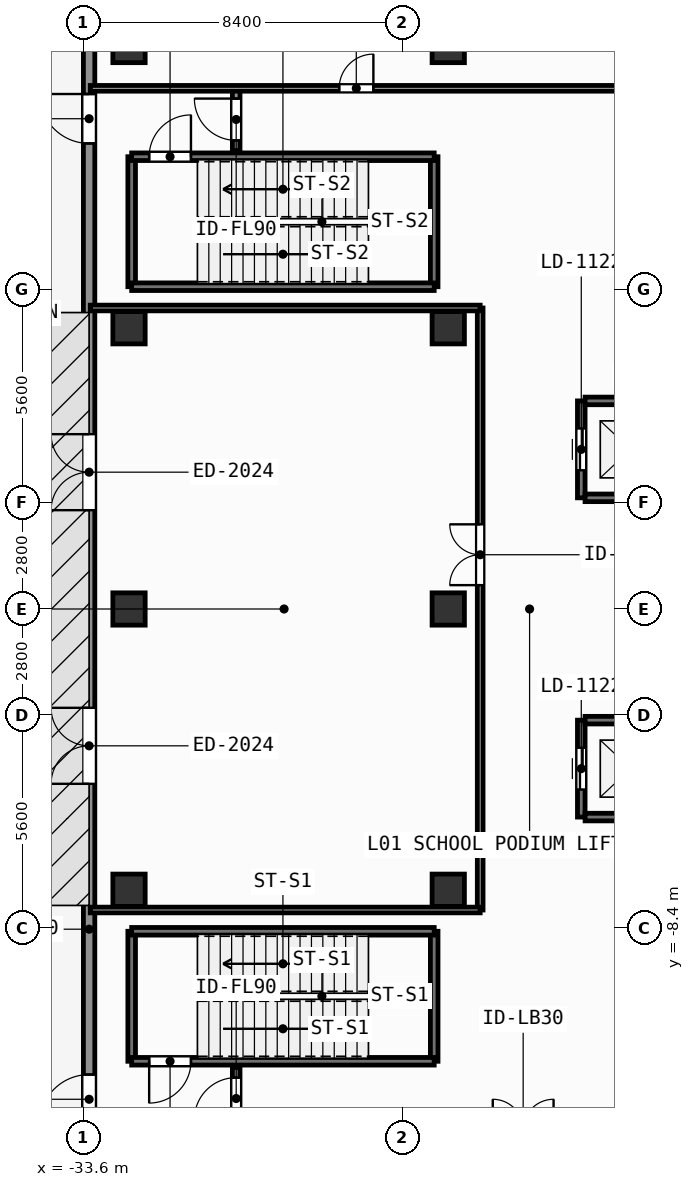
"""IFC4 building model, lengths in metres.
Left out: names, types, materials, properties, quantities, classifications, styles, units other than length and angle.
Written with IfcOpenShell. Run it as: python <this file> out.ifc"""

import sys

from ifc_helpers import new_model, si_unit, direction, frame, frame_2d, origin, origin_2d, place, context, subcontext, project, spatial, rectangle, extrude, element, fill, save


model = new_model("IFC4")
c1 = context("Model", 3, precision=1e-05, world=origin(), true_north=direction((0.0, 1.0)))
c2 = subcontext(c1, "Body", "Model", "MODEL_VIEW")
j1 = project(units=[si_unit("LENGTHUNIT", "METRE"), si_unit("PLANEANGLEUNIT", "RADIAN")], contexts=[c1])
p1 = place(None, origin())
s1 = spatial("IfcSite", under=j1, at=p1, CompositionType="ELEMENT")
p2 = place(p1, origin())
s2 = spatial("IfcBuilding", under=s1, at=p2, CompositionType="ELEMENT")
p3 = place(p2, origin())
s3 = spatial("IfcBuildingStorey", under=s2, at=p3, CompositionType="ELEMENT", Elevation=0.0)
for number, where, z_axis, x_axis in (
    (1, (-32.4, -7.4, 0.0), (0.0, 0.0, 1.0), (1.0, 0.0, 0.0)),
    (2, (-32.4, 0.0, 0.0), (0.0, 0.0, 1.0), (1.0, 0.0, 0.0)),
    (3, (-32.4, 7.4, 0.0), (0.0, 0.0, 1.0), (1.0, 0.0, 0.0)),
    (4, (-32.4, 14.8, 0.0), (0.0, 0.0, 1.0), (1.0, 0.0, 0.0)),
    (5, (-24.0, -7.4, 0.0), (0.0, 0.0, 1.0), (1.0, 0.0, 0.0)),
    (6, (-24.0, 0.0, 0.0), (0.0, 0.0, 1.0), (1.0, 0.0, 0.0)),
    (7, (-24.0, 7.4, 0.0), (0.0, 0.0, 1.0), (1.0, 0.0, 0.0)),
    (8, (-24.0, 14.8, 0.0), (0.0, 0.0, 1.0), (1.0, 0.0, 0.0)),
):
    element("IfcColumn", number, at=place(p3, frame(where, z_axis=z_axis, x_axis=x_axis)), inside=s3, PredefinedType="COLUMN", context=c2, shape_type="SweptSolid", body=[
        extrude(rectangle(XDim=0.85, YDim=0.85, at=origin_2d()), origin(), (0.0, 0.0, 1.0), 4.8),
    ])
p4 = place(p3, frame((-33.45, -20.5, 0.0), z_axis=(0.0, 0.0, 1.0), x_axis=(0.0, 1.0, 0.0)))
e9 = element("IfcWall", 9, at=p4, inside=s3, PredefinedType="SOLIDWALL", context=c2, shape_type="SweptSolid", body=[
    extrude(rectangle(XDim=41.0, YDim=0.3, at=frame_2d((20.5, 0.0))), origin(), (0.0, 0.0, 1.0), 4.56),
])
p5 = place(p4, frame((15.9, 0.0, 0.0)))
e10 = element("IfcOpeningElement", 10, at=p5, cuts=e9, PredefinedType="OPENING", context=c2, shape_type="SweptSolid", body=[
    extrude(rectangle(XDim=2.0, YDim=2.4, at=frame_2d((1.0, 1.2))), frame((0.0, 0.16, 0.0), z_axis=(0.0, -1.0, 0.0), x_axis=(1.0, 0.0, 0.0)), (0.0, 0.0, 1.0), 0.32),
])
p6 = place(p4, frame((23.1, 0.0, 0.0)))
e11 = element("IfcOpeningElement", 11, at=p6, cuts=e9, PredefinedType="OPENING", context=c2, shape_type="SweptSolid", body=[
    extrude(rectangle(XDim=2.0, YDim=2.4, at=frame_2d((1.0, 1.2))), frame((0.0, 0.16, 0.0), z_axis=(0.0, -1.0, 0.0), x_axis=(1.0, 0.0, 0.0)), (0.0, 0.0, 1.0), 0.32),
])
p7 = place(p4, frame((6.95, 0.0, 0.0)))
e12 = element("IfcOpeningElement", 12, at=p7, cuts=e9, PredefinedType="OPENING", context=c2, shape_type="SweptSolid", body=[
    extrude(rectangle(XDim=1.3, YDim=2.2, at=frame_2d((0.65, 1.1))), frame((0.0, 0.16, 0.0), z_axis=(0.0, -1.0, 0.0), x_axis=(1.0, 0.0, 0.0)), (0.0, 0.0, 1.0), 0.32),
])
p8 = place(p4, frame((32.75, 0.0, 0.0)))
e13 = element("IfcOpeningElement", 13, at=p8, cuts=e9, PredefinedType="OPENING", context=c2, shape_type="SweptSolid", body=[
    extrude(rectangle(XDim=1.3, YDim=2.2, at=frame_2d((0.65, 1.1))), frame((0.0, 0.16, 0.0), z_axis=(0.0, -1.0, 0.0), x_axis=(1.0, 0.0, 0.0)), (0.0, 0.0, 1.0), 0.32),
])
p9 = place(p3, frame((-20.5, -5.475, 0.0), z_axis=(0.0, 0.0, 1.0), x_axis=(0.0, 1.0, 0.0)))
e14 = element("IfcWall", 14, at=p9, inside=s3, PredefinedType="SHEAR", context=c2, shape_type="SweptSolid", body=[
    extrude(rectangle(XDim=2.55, YDim=0.2, at=frame_2d((1.275, 0.0))), origin(), (0.0, 0.0, 1.0), 4.56),
])
p10 = place(p9, frame((0.725, 0.0, 0.0)))
e15 = element("IfcOpeningElement", 15, at=p10, cuts=e14, PredefinedType="OPENING", context=c2, shape_type="SweptSolid", body=[
    extrude(rectangle(XDim=1.1, YDim=2.2, at=frame_2d((0.55, 1.1))), frame((0.0, 0.11, 0.0), z_axis=(0.0, -1.0, 0.0), x_axis=(1.0, 0.0, 0.0)), (0.0, 0.0, 1.0), 0.22),
])
for number, where, z_axis, x_axis in (
    (16, (-20.4, -5.475, 0.0), (0.0, 0.0, 1.0), (1.0, 0.0, 0.0)),
    (17, (-20.4, -2.925, 0.0), (0.0, 0.0, 1.0), (1.0, 0.0, 0.0)),
):
    element("IfcWall", number, at=place(p3, frame(where, z_axis=z_axis, x_axis=x_axis)), inside=s3, PredefinedType="SHEAR", context=c2, shape_type="SweptSolid", body=[
        extrude(rectangle(XDim=2.4, YDim=0.2, at=frame_2d((1.2, 0.0))), origin(), (0.0, 0.0, 1.0), 4.56),
    ])
p11 = place(p3, frame((-20.5, 2.925, 0.0), z_axis=(0.0, 0.0, 1.0), x_axis=(0.0, 1.0, 0.0)))
e18 = element("IfcWall", 18, at=p11, inside=s3, PredefinedType="SHEAR", context=c2, shape_type="SweptSolid", body=[
    extrude(rectangle(XDim=2.55, YDim=0.2, at=frame_2d((1.275, 0.0))), origin(), (0.0, 0.0, 1.0), 4.56),
])
p12 = place(p11, frame((0.725, 0.0, 0.0)))
e19 = element("IfcOpeningElement", 19, at=p12, cuts=e18, PredefinedType="OPENING", context=c2, shape_type="SweptSolid", body=[
    extrude(rectangle(XDim=1.1, YDim=2.2, at=frame_2d((0.55, 1.1))), frame((0.0, 0.11, 0.0), z_axis=(0.0, -1.0, 0.0), x_axis=(1.0, 0.0, 0.0)), (0.0, 0.0, 1.0), 0.22),
])
for number, where, z_axis, x_axis in (
    (20, (-20.4, 2.925, 0.0), (0.0, 0.0, 1.0), (1.0, 0.0, 0.0)),
    (21, (-20.4, 5.475, 0.0), (0.0, 0.0, 1.0), (1.0, 0.0, 0.0)),
):
    element("IfcWall", number, at=place(p3, frame(where, z_axis=z_axis, x_axis=x_axis)), inside=s3, PredefinedType="SHEAR", context=c2, shape_type="SweptSolid", body=[
        extrude(rectangle(XDim=2.4, YDim=0.2, at=frame_2d((1.2, 0.0))), origin(), (0.0, 0.0, 1.0), 4.56),
    ])
for number, where, z_axis, x_axis in (
    (22, (-32.33, -11.9, 0.0), (0.0, 0.0, 1.0), (0.0, 1.0, 0.0)),
    (23, (-24.37, -8.48, 0.0), (0.0, 0.0, 1.0), (0.0, -1.0, 0.0)),
):
    element("IfcWall", number, at=place(p3, frame(where, z_axis=z_axis, x_axis=x_axis)), inside=s3, PredefinedType="SHEAR", context=c2, shape_type="SweptSolid", body=[
        extrude(rectangle(XDim=3.42, YDim=0.2, at=frame_2d((1.71, 0.0))), origin(), (0.0, 0.0, 1.0), 4.56),
    ])
p13 = place(p3, frame((-24.37, -11.9, 0.0), z_axis=(0.0, 0.0, 1.0), x_axis=(-1.0, 0.0, 0.0)))
e24 = element("IfcWall", 24, at=p13, inside=s3, PredefinedType="SHEAR", context=c2, shape_type="SweptSolid", body=[
    extrude(rectangle(XDim=7.96, YDim=0.2, at=frame_2d((3.98, 0.0))), origin(), (0.0, 0.0, 1.0), 4.56),
])
p14 = place(p13, frame((6.4, 0.0, 0.0)))
e25 = element("IfcOpeningElement", 25, at=p14, cuts=e24, PredefinedType="OPENING", context=c2, shape_type="SweptSolid", body=[
    extrude(rectangle(XDim=1.1, YDim=2.15, at=frame_2d((0.55, 1.075))), frame((0.0, 0.11, 0.0), z_axis=(0.0, -1.0, 0.0), x_axis=(1.0, 0.0, 0.0)), (0.0, 0.0, 1.0), 0.22),
])
p15 = place(p3, frame((-32.33, -8.48, 0.0), z_axis=(0.0, 0.0, 1.0), x_axis=(1.0, 0.0, 0.0)))
e26 = element("IfcWall", 26, at=p15, inside=s3, PredefinedType="SHEAR", context=c2, shape_type="SweptSolid", body=[
    extrude(rectangle(XDim=7.96, YDim=0.2, at=frame_2d((3.98, 0.0))), origin(), (0.0, 0.0, 1.0), 4.56),
])
for number, where, z_axis, x_axis in (
    (27, (-32.33, 8.48, 0.0), (0.0, 0.0, 1.0), (0.0, 1.0, 0.0)),
    (28, (-24.37, 11.9, 0.0), (0.0, 0.0, 1.0), (0.0, -1.0, 0.0)),
):
    element("IfcWall", number, at=place(p3, frame(where, z_axis=z_axis, x_axis=x_axis)), inside=s3, PredefinedType="SHEAR", context=c2, shape_type="SweptSolid", body=[
        extrude(rectangle(XDim=3.42, YDim=0.2, at=frame_2d((1.71, 0.0))), origin(), (0.0, 0.0, 1.0), 4.56),
    ])
p16 = place(p3, frame((-24.37, 8.48, 0.0), z_axis=(0.0, 0.0, 1.0), x_axis=(-1.0, 0.0, 0.0)))
e29 = element("IfcWall", 29, at=p16, inside=s3, PredefinedType="SHEAR", context=c2, shape_type="SweptSolid", body=[
    extrude(rectangle(XDim=7.96, YDim=0.2, at=frame_2d((3.98, 0.0))), origin(), (0.0, 0.0, 1.0), 4.56),
])
p17 = place(p3, frame((-32.33, 11.9, 0.0), z_axis=(0.0, 0.0, 1.0), x_axis=(1.0, 0.0, 0.0)))
e30 = element("IfcWall", 30, at=p17, inside=s3, PredefinedType="SHEAR", context=c2, shape_type="SweptSolid", body=[
    extrude(rectangle(XDim=7.96, YDim=0.2, at=frame_2d((3.98, 0.0))), origin(), (0.0, 0.0, 1.0), 4.56),
])
p18 = place(p17, frame((0.46, 0.0, 0.0)))
e31 = element("IfcOpeningElement", 31, at=p18, cuts=e30, PredefinedType="OPENING", context=c2, shape_type="SweptSolid", body=[
    extrude(rectangle(XDim=1.1, YDim=2.15, at=frame_2d((0.55, 1.075))), frame((0.0, 0.11, 0.0), z_axis=(0.0, -1.0, 0.0), x_axis=(1.0, 0.0, 0.0)), (0.0, 0.0, 1.0), 0.22),
])
p19 = place(p3, frame((-29.58, -13.7, 0.0), z_axis=(0.0, 0.0, 1.0), x_axis=(0.0, 1.0, 0.0)))
e32 = element("IfcWall", 32, at=p19, inside=s3, PredefinedType="SOLIDWALL", context=c2, shape_type="SweptSolid", body=[
    extrude(rectangle(XDim=1.64, YDim=0.2, at=frame_2d((0.82, 0.0))), origin(), (0.0, 0.0, 1.0), 4.56),
])
p20 = place(p19, frame((0.27, 0.0, 0.0)))
e33 = element("IfcOpeningElement", 33, at=p20, cuts=e32, PredefinedType="OPENING", context=c2, shape_type="SweptSolid", body=[
    extrude(rectangle(XDim=1.1, YDim=2.15, at=frame_2d((0.55, 1.075))), frame((0.0, 0.11, 0.0), z_axis=(0.0, -1.0, 0.0), x_axis=(1.0, 0.0, 0.0)), (0.0, 0.0, 1.0), 0.22),
])
p21 = place(p3, frame((-29.58, 12.06, 0.0), z_axis=(0.0, 0.0, 1.0), x_axis=(0.0, 1.0, 0.0)))
e34 = element("IfcWall", 34, at=p21, inside=s3, PredefinedType="SOLIDWALL", context=c2, shape_type="SweptSolid", body=[
    extrude(rectangle(XDim=1.64, YDim=0.2, at=frame_2d((0.82, 0.0))), origin(), (0.0, 0.0, 1.0), 4.56),
])
p22 = place(p21, frame((0.27, 0.0, 0.0)))
e35 = element("IfcOpeningElement", 35, at=p22, cuts=e34, PredefinedType="OPENING", context=c2, shape_type="SweptSolid", body=[
    extrude(rectangle(XDim=1.1, YDim=2.15, at=frame_2d((0.55, 1.075))), frame((0.0, 0.11, 0.0), z_axis=(0.0, -1.0, 0.0), x_axis=(1.0, 0.0, 0.0)), (0.0, 0.0, 1.0), 0.22),
])
p23 = place(p3, frame((-33.42, 13.7, 0.0), z_axis=(0.0, 0.0, 1.0), x_axis=(1.0, 0.0, 0.0)))
e36 = element("IfcWall", 36, at=p23, inside=s3, PredefinedType="PARTITIONING", context=c2, shape_type="SweptSolid", body=[
    extrude(rectangle(XDim=14.0, YDim=0.15, at=frame_2d((7.0, 0.0))), origin(), (0.0, 0.0, 1.0), 4.56),
])
p24 = place(p23, frame((6.55, 0.0, 0.0)))
e37 = element("IfcOpeningElement", 37, at=p24, cuts=e36, PredefinedType="OPENING", context=c2, shape_type="SweptSolid", body=[
    extrude(rectangle(XDim=0.9, YDim=2.1, at=frame_2d((0.45, 1.05))), frame((0.0, 0.085, 0.0), z_axis=(0.0, -1.0, 0.0), x_axis=(1.0, 0.0, 0.0)), (0.0, 0.0, 1.0), 0.17),
])
p25 = place(p3, frame((-23.16, -7.92, 0.0), z_axis=(0.0, 0.0, 1.0), x_axis=(0.0, 1.0, 0.0)))
e38 = element("IfcWall", 38, at=p25, inside=s3, PredefinedType="PARTITIONING", context=c2, shape_type="SweptSolid", body=[
    extrude(rectangle(XDim=15.84, YDim=0.15, at=frame_2d((7.92, 0.0))), origin(), (0.0, 0.0, 1.0), 4.56),
])
p26 = place(p25, frame((8.548, 0.0, 0.0)))
e39 = element("IfcOpeningElement", 39, at=p26, cuts=e38, PredefinedType="OPENING", context=c2, shape_type="SweptSolid", body=[
    extrude(rectangle(XDim=1.6, YDim=2.3, at=frame_2d((0.8, 1.15))), frame((0.0, 0.085, 0.0), z_axis=(0.0, -1.0, 0.0), x_axis=(1.0, 0.0, 0.0)), (0.0, 0.0, 1.0), 0.17),
])
for number, where, z_axis, x_axis in (
    (40, (-33.42, -7.92, 0.0), (0.0, 0.0, 1.0), (1.0, 0.0, 0.0)),
    (41, (-33.42, 7.92, 0.0), (0.0, 0.0, 1.0), (1.0, 0.0, 0.0)),
):
    element("IfcWall", number, at=place(p3, frame(where, z_axis=z_axis, x_axis=x_axis)), inside=s3, PredefinedType="PARTITIONING", context=c2, shape_type="SweptSolid", body=[
        extrude(rectangle(XDim=10.26, YDim=0.15, at=frame_2d((5.13, 0.0))), origin(), (0.0, 0.0, 1.0), 4.56),
    ])
p27 = place(p5, origin())
e42 = element("IfcDoor", 42, at=p27, inside=s3, OperationType="SINGLE_SWING_LEFT", PredefinedType="DOOR", context=c2, shape_type="SweptSolid", body=[
    extrude(rectangle(XDim=2.0, YDim=2.4, at=frame_2d((1.0, 1.2))), frame((0.0, 0.025, 0.0), z_axis=(0.0, -1.0, 0.0), x_axis=(1.0, 0.0, 0.0)), (0.0, 0.0, 1.0), 0.05),
])
fill(e10, e42)
p28 = place(p6, origin())
e43 = element("IfcDoor", 43, at=p28, inside=s3, OperationType="SINGLE_SWING_LEFT", PredefinedType="DOOR", context=c2, shape_type="SweptSolid", body=[
    extrude(rectangle(XDim=2.0, YDim=2.4, at=frame_2d((1.0, 1.2))), frame((0.0, 0.025, 0.0), z_axis=(0.0, -1.0, 0.0), x_axis=(1.0, 0.0, 0.0)), (0.0, 0.0, 1.0), 0.05),
])
fill(e11, e43)
p29 = place(p7, origin())
e44 = element("IfcDoor", 44, at=p29, inside=s3, OperationType="SINGLE_SWING_LEFT", PredefinedType="DOOR", context=c2, shape_type="SweptSolid", body=[
    extrude(rectangle(XDim=1.3, YDim=2.2, at=frame_2d((0.65, 1.1))), frame((0.0, 0.025, 0.0), z_axis=(0.0, -1.0, 0.0), x_axis=(1.0, 0.0, 0.0)), (0.0, 0.0, 1.0), 0.05),
])
fill(e12, e44)
p30 = place(p8, origin())
e45 = element("IfcDoor", 45, at=p30, inside=s3, OperationType="SINGLE_SWING_RIGHT", PredefinedType="DOOR", context=c2, shape_type="SweptSolid", body=[
    extrude(rectangle(XDim=1.3, YDim=2.2, at=frame_2d((0.65, 1.1))), frame((0.0, 0.025, 0.0), z_axis=(0.0, -1.0, 0.0), x_axis=(1.0, 0.0, 0.0)), (0.0, 0.0, 1.0), 0.05),
])
fill(e13, e45)
p31 = place(p10, origin())
e46 = element("IfcDoor", 46, at=p31, inside=s3, OperationType="SLIDING_TO_LEFT", PredefinedType="DOOR", context=c2, shape_type="SweptSolid", body=[
    extrude(rectangle(XDim=1.1, YDim=2.2, at=frame_2d((0.55, 1.1))), frame((0.0, 0.025, 0.0), z_axis=(0.0, -1.0, 0.0), x_axis=(1.0, 0.0, 0.0)), (0.0, 0.0, 1.0), 0.05),
])
fill(e15, e46)
p32 = place(p12, origin())
e47 = element("IfcDoor", 47, at=p32, inside=s3, OperationType="SLIDING_TO_LEFT", PredefinedType="DOOR", context=c2, shape_type="SweptSolid", body=[
    extrude(rectangle(XDim=1.1, YDim=2.2, at=frame_2d((0.55, 1.1))), frame((0.0, 0.025, 0.0), z_axis=(0.0, -1.0, 0.0), x_axis=(1.0, 0.0, 0.0)), (0.0, 0.0, 1.0), 0.05),
])
fill(e19, e47)
p33 = place(p14, origin())
e48 = element("IfcDoor", 48, at=p33, inside=s3, OperationType="SINGLE_SWING_RIGHT", PredefinedType="DOOR", context=c2, shape_type="SweptSolid", body=[
    extrude(rectangle(XDim=1.1, YDim=2.15, at=frame_2d((0.55, 1.075))), frame((0.0, 0.025, 0.0), z_axis=(0.0, -1.0, 0.0), x_axis=(1.0, 0.0, 0.0)), (0.0, 0.0, 1.0), 0.05),
])
fill(e25, e48)
p34 = place(p18, origin())
e49 = element("IfcDoor", 49, at=p34, inside=s3, OperationType="SINGLE_SWING_RIGHT", PredefinedType="DOOR", context=c2, shape_type="SweptSolid", body=[
    extrude(rectangle(XDim=1.1, YDim=2.15, at=frame_2d((0.55, 1.075))), frame((0.0, 0.025, 0.0), z_axis=(0.0, -1.0, 0.0), x_axis=(1.0, 0.0, 0.0)), (0.0, 0.0, 1.0), 0.05),
])
fill(e31, e49)
p35 = place(p20, origin())
e50 = element("IfcDoor", 50, at=p35, inside=s3, OperationType="SINGLE_SWING_LEFT", PredefinedType="DOOR", context=c2, shape_type="SweptSolid", body=[
    extrude(rectangle(XDim=1.1, YDim=2.15, at=frame_2d((0.55, 1.075))), frame((0.0, 0.025, 0.0), z_axis=(0.0, -1.0, 0.0), x_axis=(1.0, 0.0, 0.0)), (0.0, 0.0, 1.0), 0.05),
])
fill(e33, e50)
p36 = place(p22, origin())
e51 = element("IfcDoor", 51, at=p36, inside=s3, OperationType="SINGLE_SWING_RIGHT", PredefinedType="DOOR", context=c2, shape_type="SweptSolid", body=[
    extrude(rectangle(XDim=1.1, YDim=2.15, at=frame_2d((0.55, 1.075))), frame((0.0, 0.025, 0.0), z_axis=(0.0, -1.0, 0.0), x_axis=(1.0, 0.0, 0.0)), (0.0, 0.0, 1.0), 0.05),
])
fill(e35, e51)
p37 = place(p24, origin())
e52 = element("IfcDoor", 52, at=p37, inside=s3, OperationType="SINGLE_SWING_RIGHT", PredefinedType="DOOR", context=c2, shape_type="SweptSolid", body=[
    extrude(rectangle(XDim=0.9, YDim=2.1, at=frame_2d((0.45, 1.05))), frame((0.0, 0.025, 0.0), z_axis=(0.0, -1.0, 0.0), x_axis=(1.0, 0.0, 0.0)), (0.0, 0.0, 1.0), 0.05),
])
fill(e37, e52)
p38 = place(p26, origin())
e53 = element("IfcDoor", 53, at=p38, inside=s3, OperationType="SINGLE_SWING_LEFT", PredefinedType="DOOR", context=c2, shape_type="SweptSolid", body=[
    extrude(rectangle(XDim=1.6, YDim=2.3, at=frame_2d((0.8, 1.15))), frame((0.0, 0.025, 0.0), z_axis=(0.0, -1.0, 0.0), x_axis=(1.0, 0.0, 0.0)), (0.0, 0.0, 1.0), 0.05),
])
fill(e39, e53)
save(model, sys.argv[1])
